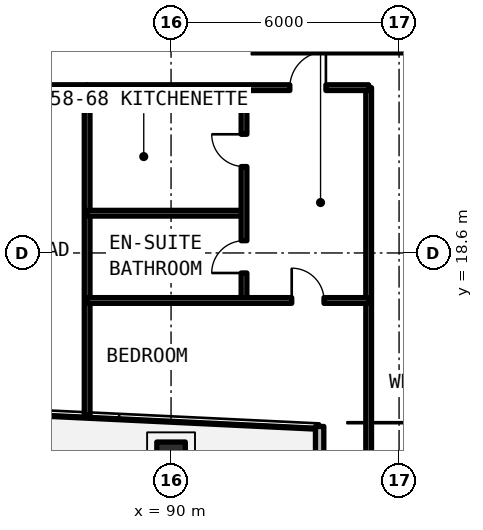
"""IFC4 building model, lengths in metres.
Left out: names, types, materials, properties, quantities, classifications, styles, units other than length and angle.
Written with IfcOpenShell. Run it as: python <this file> out.ifc"""

import sys

from ifc_helpers import new_model, si_unit, direction, frame, frame_2d, origin, origin_2d, place, context, subcontext, project, spatial, rectangle, extrude, element, fill, save


model = new_model("IFC4")
c1 = context("Model", 3, precision=1e-05, world=origin(), true_north=direction((0.0, 1.0)))
c2 = subcontext(c1, "Body", "Model", "MODEL_VIEW")
j1 = project(units=[si_unit("LENGTHUNIT", "METRE"), si_unit("PLANEANGLEUNIT", "RADIAN")], contexts=[c1])
p1 = place(None, origin())
s1 = spatial("IfcSite", under=j1, at=p1, CompositionType="ELEMENT")
p2 = place(p1, origin())
s2 = spatial("IfcBuilding", under=s1, at=p2, CompositionType="ELEMENT")
p3 = place(p2, frame((0.0, 0.0, 208.23)))
s3 = spatial("IfcBuildingStorey", under=s2, at=p3, CompositionType="ELEMENT", Elevation=208.23)
for number, where, z_axis, x_axis in (
    (1, (90.0, 18.6, 0.0), (0.0, 0.0, 1.0), (1.0, 0.0, 0.0)),
    (2, (90.0, 13.25, 0.0), (0.0, 0.0, 1.0), (1.0, 0.0, 0.0)),
):
    element("IfcColumn", number, at=place(p3, frame(where, z_axis=z_axis, x_axis=x_axis)), inside=s3, PredefinedType="COLUMN", context=c2, shape_type="SweptSolid", body=[
        extrude(rectangle(XDim=0.75, YDim=0.75, at=origin_2d()), origin(), (0.0, 0.0, 1.0), 3.63),
    ])
p4 = place(p3, frame((93.91, 14.035, 0.0), z_axis=(0.0, 0.0, 1.0), x_axis=(0.0, -1.0, 0.0)))
e3 = element("IfcWall", 3, at=p4, inside=s3, PredefinedType="SOLIDWALL", context=c2, shape_type="SweptSolid", body=[
    extrude(rectangle(XDim=1.875, YDim=0.22, at=frame_2d((0.938, 0.0))), origin(), (0.0, 0.0, 1.0), 3.41),
])
p5 = place(p3, frame((95.354, 12.16, 0.0), z_axis=(0.0, 0.0, 1.0), x_axis=(0.707085909342, 0.707127652415, 0.0)))
e4 = element("IfcWall", 4, at=p5, inside=s3, PredefinedType="SOLIDWALL", context=c2, shape_type="SweptSolid", body=[
    extrude(rectangle(XDim=5.849, YDim=0.22, at=frame_2d((2.924, 0.0))), origin(), (0.0, 0.0, 1.0), 3.41),
])
p6 = place(p5, frame((1.224, 0.0, 0.78)))
e5 = element("IfcOpeningElement", 5, at=p6, cuts=e4, PredefinedType="OPENING", context=c2, shape_type="SweptSolid", body=[
    extrude(rectangle(XDim=3.4, YDim=1.66, at=frame_2d((1.7, 0.83))), frame((0.0, 0.12, 0.0), z_axis=(0.0, -1.0, 0.0), x_axis=(1.0, 0.0, 0.0)), (0.0, 0.0, 1.0), 0.24),
])
p7 = place(p3, frame((95.2, 12.16, 0.0), z_axis=(0.0, 0.0, 1.0), x_axis=(0.0, 1.0, 0.0)))
e6 = element("IfcWall", 6, at=p7, inside=s3, PredefinedType="SOLIDWALL", context=c2, shape_type="SweptSolid", body=[
    extrude(rectangle(XDim=10.79, YDim=0.15, at=frame_2d((5.395, 0.0))), origin(), (0.0, 0.0, 1.0), 2.63),
])
p8 = place(p3, frame((87.792, 14.328, 0.0), z_axis=(0.0, 0.0, 1.0), x_axis=(0.0, 1.0, 0.0)))
e7 = element("IfcWall", 7, at=p8, inside=s3, PredefinedType="SOLIDWALL", context=c2, shape_type="SweptSolid", body=[
    extrude(rectangle(XDim=8.622, YDim=0.15, at=frame_2d((4.311, 0.0))), origin(), (0.0, 0.0, 1.0), 2.63),
])
p9 = place(p3, frame((80.657, 22.95, 0.0), z_axis=(0.0, 0.0, 1.0), x_axis=(1.0, 0.0, 0.0)))
e8 = element("IfcWall", 8, at=p9, inside=s3, PredefinedType="SOLIDWALL", context=c2, shape_type="SweptSolid", body=[
    extrude(rectangle(XDim=7.134, YDim=0.15, at=frame_2d((3.567, 0.0))), origin(), (0.0, 0.0, 1.0), 2.63),
])
p10 = place(p9, frame((4.307, 0.0, 0.0)))
e9 = element("IfcOpeningElement", 9, at=p10, cuts=e8, PredefinedType="OPENING", context=c2, shape_type="SweptSolid", body=[
    extrude(rectangle(XDim=0.95, YDim=2.15, at=frame_2d((0.475, 1.075))), frame((0.0, 0.085, 0.0), z_axis=(0.0, -1.0, 0.0), x_axis=(1.0, 0.0, 0.0)), (0.0, 0.0, 1.0), 0.17),
])
p11 = place(p3, frame((87.792, 19.646, 0.0), z_axis=(0.0, 0.0, 1.0), x_axis=(1.0, 0.0, 0.0)))
e10 = element("IfcWall", 10, at=p11, inside=s3, PredefinedType="PARTITIONING", context=c2, shape_type="SweptSolid", body=[
    extrude(rectangle(XDim=4.128, YDim=0.15, at=frame_2d((2.064, 0.0))), origin(), (0.0, 0.0, 1.0), 2.63),
])
p12 = place(p3, frame((91.92, 17.35, 0.0), z_axis=(0.0, 0.0, 1.0), x_axis=(0.0, 1.0, 0.0)))
e11 = element("IfcWall", 11, at=p12, inside=s3, PredefinedType="PARTITIONING", context=c2, shape_type="SweptSolid", body=[
    extrude(rectangle(XDim=5.6, YDim=0.15, at=frame_2d((2.8, 0.0))), origin(), (0.0, 0.0, 1.0), 2.63),
])
p13 = place(p12, frame((0.723, 0.0, 0.0)))
e12 = element("IfcOpeningElement", 12, at=p13, cuts=e11, PredefinedType="OPENING", context=c2, shape_type="SweptSolid", body=[
    extrude(rectangle(XDim=0.85, YDim=2.1, at=frame_2d((0.425, 1.05))), frame((0.0, 0.085, 0.0), z_axis=(0.0, -1.0, 0.0), x_axis=(1.0, 0.0, 0.0)), (0.0, 0.0, 1.0), 0.17),
])
p14 = place(p12, frame((3.523, 0.0, 0.0)))
e13 = element("IfcOpeningElement", 13, at=p14, cuts=e11, PredefinedType="OPENING", context=c2, shape_type="SweptSolid", body=[
    extrude(rectangle(XDim=0.85, YDim=2.1, at=frame_2d((0.425, 1.05))), frame((0.0, 0.085, 0.0), z_axis=(0.0, -1.0, 0.0), x_axis=(1.0, 0.0, 0.0)), (0.0, 0.0, 1.0), 0.17),
])
p15 = place(p3, frame((87.792, 17.35, 0.0), z_axis=(0.0, 0.0, 1.0), x_axis=(1.0, 0.0, 0.0)))
e14 = element("IfcWall", 14, at=p15, inside=s3, PredefinedType="PARTITIONING", context=c2, shape_type="SweptSolid", body=[
    extrude(rectangle(XDim=7.408, YDim=0.15, at=frame_2d((3.704, 0.0))), origin(), (0.0, 0.0, 1.0), 2.63),
])
p16 = place(p15, frame((5.384, 0.0, 0.0)))
e15 = element("IfcOpeningElement", 15, at=p16, cuts=e14, PredefinedType="OPENING", context=c2, shape_type="SweptSolid", body=[
    extrude(rectangle(XDim=0.85, YDim=2.1, at=frame_2d((0.425, 1.05))), frame((0.0, 0.085, 0.0), z_axis=(0.0, -1.0, 0.0), x_axis=(1.0, 0.0, 0.0)), (0.0, 0.0, 1.0), 0.17),
])
p17 = place(p3, frame((87.792, 22.95, 0.0), z_axis=(0.0, 0.0, 1.0), x_axis=(1.0, 0.0, 0.0)))
e16 = element("IfcWall", 16, at=p17, inside=s3, PredefinedType="SOLIDWALL", context=c2, shape_type="SweptSolid", body=[
    extrude(rectangle(XDim=7.408, YDim=0.15, at=frame_2d((3.704, 0.0))), origin(), (0.0, 0.0, 1.0), 2.63),
])
p18 = place(p17, frame((5.333, 0.0, 0.0)))
e17 = element("IfcOpeningElement", 17, at=p18, cuts=e16, PredefinedType="OPENING", context=c2, shape_type="SweptSolid", body=[
    extrude(rectangle(XDim=0.95, YDim=2.15, at=frame_2d((0.475, 1.075))), frame((0.0, 0.085, 0.0), z_axis=(0.0, -1.0, 0.0), x_axis=(1.0, 0.0, 0.0)), (0.0, 0.0, 1.0), 0.17),
])
p19 = place(p13, origin())
e18 = element("IfcDoor", 18, at=p19, inside=s3, OperationType="SINGLE_SWING_LEFT", PredefinedType="DOOR", context=c2, shape_type="SweptSolid", body=[
    extrude(rectangle(XDim=0.85, YDim=2.1, at=frame_2d((0.425, 1.05))), frame((0.0, 0.025, 0.0), z_axis=(0.0, -1.0, 0.0), x_axis=(1.0, 0.0, 0.0)), (0.0, 0.0, 1.0), 0.05),
])
fill(e12, e18)
p20 = place(p14, origin())
e19 = element("IfcDoor", 19, at=p20, inside=s3, OperationType="SINGLE_SWING_RIGHT", PredefinedType="DOOR", context=c2, shape_type="SweptSolid", body=[
    extrude(rectangle(XDim=0.85, YDim=2.1, at=frame_2d((0.425, 1.05))), frame((0.0, 0.025, 0.0), z_axis=(0.0, -1.0, 0.0), x_axis=(1.0, 0.0, 0.0)), (0.0, 0.0, 1.0), 0.05),
])
fill(e13, e19)
p21 = place(p16, origin())
e20 = element("IfcDoor", 20, at=p21, inside=s3, OperationType="SINGLE_SWING_LEFT", PredefinedType="DOOR", context=c2, shape_type="SweptSolid", body=[
    extrude(rectangle(XDim=0.85, YDim=2.1, at=frame_2d((0.425, 1.05))), frame((0.0, 0.025, 0.0), z_axis=(0.0, -1.0, 0.0), x_axis=(1.0, 0.0, 0.0)), (0.0, 0.0, 1.0), 0.05),
])
fill(e15, e20)
p22 = place(p18, origin())
e21 = element("IfcDoor", 21, at=p22, inside=s3, OperationType="SINGLE_SWING_RIGHT", PredefinedType="DOOR", context=c2, shape_type="SweptSolid", body=[
    extrude(rectangle(XDim=0.95, YDim=2.15, at=frame_2d((0.475, 1.075))), frame((0.0, 0.025, 0.0), z_axis=(0.0, -1.0, 0.0), x_axis=(1.0, 0.0, 0.0)), (0.0, 0.0, 1.0), 0.05),
])
fill(e17, e21)
save(model, sys.argv[1])
